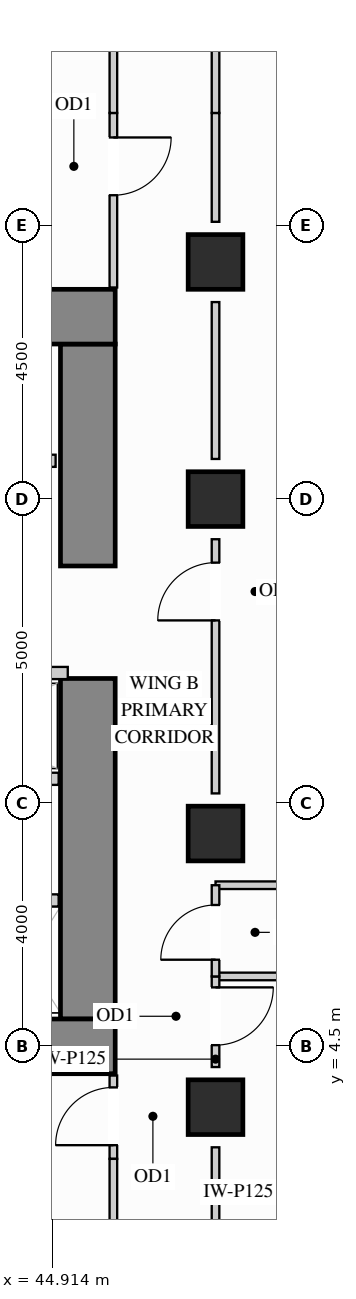
"""IFC4 building model, lengths in metres.
Left out: names, types, materials, properties, quantities, classifications, styles, units other than length and angle.
Written with IfcOpenShell. Run it as: python <this file> out.ifc"""

import sys

from ifc_helpers import new_model, si_unit, direction, frame, frame_2d, origin, origin_2d, place, context, subcontext, project, spatial, rectangle, extrude, source, transform, mapped, element, fill, save


model = new_model("IFC4")
c1 = context("Model", 3, precision=1e-05, world=origin(), true_north=direction((0.0, 1.0)))
c2 = subcontext(c1, "Body", "Model", "MODEL_VIEW")
j1 = project(units=[si_unit("LENGTHUNIT", "METRE"), si_unit("PLANEANGLEUNIT", "RADIAN")], contexts=[c1])
p1 = place(None, origin())
s1 = spatial("IfcSite", under=j1, at=p1, CompositionType="ELEMENT")
p2 = place(p1, origin())
s2 = spatial("IfcBuilding", under=s1, at=p2, CompositionType="ELEMENT")
p3 = place(p2, frame((0.0, 0.0, 58.5)))
s3 = spatial("IfcBuildingStorey", under=s2, at=p3, CompositionType="ELEMENT", Elevation=58.5)
m1 = source(origin(), c2, "Body", "SweptSolid", [
    extrude(rectangle(XDim=0.9, YDim=0.9, at=origin_2d()), origin(), (0.0, 0.0, 1.0), 3.38),
])
for number, where, z_axis, x_axis in (
    (1, (47.6, 13.5, 0.0), (0.0, 0.0, 1.0), (1.0, 0.0, 0.0)),
    (2, (47.6, 3.5, 0.0), (0.0, 0.0, 1.0), (1.0, 0.0, 0.0)),
    (3, (47.6, 8.0, 0.0), (0.0, 0.0, 1.0), (1.0, 0.0, 0.0)),
    (4, (47.6, 17.4, 0.0), (0.0, 0.0, 1.0), (1.0, 0.0, 0.0)),
):
    element("IfcColumn", number, at=place(p3, frame(where, z_axis=z_axis, x_axis=x_axis)), inside=s3, PredefinedType="COLUMN", context=c2, shape_type="MappedRepresentation", body=[
        mapped(m1, transform((0.0, 0.0, 0.0), x_axis=(1.0, 0.0, 0.0), y_axis=(0.0, 1.0, 0.0), z_axis=(0.0, 0.0, 1.0))),
    ])
m2 = source(origin(), c2, "Body", "SweptSolid", [
    extrude(rectangle(XDim=5.6, YDim=0.9, at=frame_2d((2.8, 0.0))), origin(), (0.0, 0.0, 1.0), 3.38),
])
p4 = place(p3, frame((45.5, 4.95, 0.0), z_axis=(0.0, 0.0, 1.0), x_axis=(0.0, 1.0, 0.0)))
e5 = element("IfcWall", 5, at=p4, inside=s3, PredefinedType="SHEAR", context=c2, shape_type="MappedRepresentation", body=[
    mapped(m2, transform((0.0, 0.0, 0.0), x_axis=(1.0, 0.0, 0.0), y_axis=(0.0, 1.0, 0.0), z_axis=(0.0, 0.0, 1.0))),
])
m3 = source(origin(), c2, "Body", "SweptSolid", [
    extrude(rectangle(XDim=3.65, YDim=0.9, at=frame_2d((1.825, 0.0))), origin(), (0.0, 0.0, 1.0), 3.38),
])
p5 = place(p3, frame((45.5, 12.4, 0.0), z_axis=(0.0, 0.0, 1.0), x_axis=(0.0, 1.0, 0.0)))
e6 = element("IfcWall", 6, at=p5, inside=s3, PredefinedType="SHEAR", context=c2, shape_type="MappedRepresentation", body=[
    mapped(m3, transform((0.0, 0.0, 0.0), x_axis=(1.0, 0.0, 0.0), y_axis=(0.0, 1.0, 0.0), z_axis=(0.0, 0.0, 1.0))),
])
m4 = source(origin(), c2, "Body", "SweptSolid", [
    extrude(rectangle(XDim=10.4, YDim=0.9, at=frame_2d((5.2, 0.0))), origin(), (0.0, 0.0, 1.0), 3.38),
])
for number, where, z_axis, x_axis in (
    (7, (35.55, 16.5, 0.0), (0.0, 0.0, 1.0), (1.0, 0.0, 0.0)),
    (8, (35.55, 4.5, 0.0), (0.0, 0.0, 1.0), (1.0, 0.0, 0.0)),
):
    element("IfcWall", number, at=place(p3, frame(where, z_axis=z_axis, x_axis=x_axis)), inside=s3, PredefinedType="SHEAR", context=c2, shape_type="MappedRepresentation", body=[
        mapped(m4, transform((0.0, 0.0, 0.0), x_axis=(1.0, 0.0, 0.0), y_axis=(0.0, 1.0, 0.0), z_axis=(0.0, 0.0, 1.0))),
    ])
m5 = source(origin(), c2, "Body", "SweptSolid", [
    extrude(rectangle(XDim=11.048, YDim=0.125, at=frame_2d((5.524, 0.0))), origin(), (0.0, 0.0, 1.0), 3.365),
])
for number, where, z_axis, x_axis in (
    (9, (47.6, 5.65, 0.0), (0.0, 0.0, 1.0), (1.0, 0.0, 0.0)),
    (10, (47.6, 7.15, 0.0), (0.0, 0.0, 1.0), (1.0, 0.0, 0.0)),
):
    element("IfcWall", number, at=place(p3, frame(where, z_axis=z_axis, x_axis=x_axis)), inside=s3, PredefinedType="PARTITIONING", context=c2, shape_type="MappedRepresentation", body=[
        mapped(m5, transform((0.0, 0.0, 0.0), x_axis=(1.0, 0.0, 0.0), y_axis=(0.0, 1.0, 0.0), z_axis=(0.0, 0.0, 1.0))),
    ])
p6 = place(p3, frame((47.6, 4.16, 0.0), z_axis=(0.0, 0.0, 1.0), x_axis=(0.0, 1.0, 0.0)))
e11 = element("IfcWall", 11, at=p6, inside=s3, PredefinedType="PARTITIONING", context=c2, shape_type="SweptSolid", body=[
    extrude(rectangle(XDim=1.49, YDim=0.125, at=frame_2d((0.745, 0.0))), origin(), (0.0, 0.0, 1.0), 2.67),
])
p7 = place(p6, frame((0.36, 0.0, 0.0)))
e12 = element("IfcOpeningElement", 12, at=p7, cuts=e11, PredefinedType="OPENING", context=c2, shape_type="SweptSolid", body=[
    extrude(rectangle(XDim=0.95, YDim=2.15, at=frame_2d((0.475, 1.075))), frame((0.0, 0.073, 0.0), z_axis=(0.0, -1.0, 0.0), x_axis=(1.0, 0.0, 0.0)), (0.0, 0.0, 1.0), 0.145),
])
m6 = source(origin(), c2, "Body", "SweptSolid", [
    extrude(rectangle(XDim=1.58, YDim=0.125, at=frame_2d((0.79, 0.0))), origin(), (0.0, 0.0, 1.0), 2.67),
])
p8 = place(p3, frame((47.6, 1.26, 0.0), z_axis=(0.0, 0.0, 1.0), x_axis=(0.0, 1.0, 0.0)))
e13 = element("IfcWall", 13, at=p8, inside=s3, PredefinedType="PARTITIONING", context=c2, shape_type="MappedRepresentation", body=[
    mapped(m6, transform((0.0, 0.0, 0.0), x_axis=(1.0, 0.0, 0.0), y_axis=(0.0, 1.0, 0.0), z_axis=(0.0, 0.0, 1.0))),
])
p9 = place(p3, frame((47.6, 8.66, 0.0), z_axis=(0.0, 0.0, 1.0), x_axis=(0.0, 1.0, 0.0)))
e14 = element("IfcWall", 14, at=p9, inside=s3, PredefinedType="PARTITIONING", context=c2, shape_type="SweptSolid", body=[
    extrude(rectangle(XDim=4.18, YDim=0.125, at=frame_2d((2.09, 0.0))), origin(), (0.0, 0.0, 1.0), 2.67),
])
p10 = place(p9, frame((2.845, 0.0, 0.0)))
e15 = element("IfcOpeningElement", 15, at=p10, cuts=e14, PredefinedType="OPENING", context=c2, shape_type="SweptSolid", body=[
    extrude(rectangle(XDim=0.95, YDim=2.15, at=frame_2d((0.475, 1.075))), frame((0.0, 0.073, 0.0), z_axis=(0.0, -1.0, 0.0), x_axis=(1.0, 0.0, 0.0)), (0.0, 0.0, 1.0), 0.145),
])
m7 = source(origin(), c2, "Body", "SweptSolid", [
    extrude(rectangle(XDim=2.58, YDim=0.125, at=frame_2d((1.29, 0.0))), origin(), (0.0, 0.0, 1.0), 2.67),
])
p11 = place(p3, frame((47.6, 14.16, 0.0), z_axis=(0.0, 0.0, 1.0), x_axis=(0.0, 1.0, 0.0)))
e16 = element("IfcWall", 16, at=p11, inside=s3, PredefinedType="PARTITIONING", context=c2, shape_type="MappedRepresentation", body=[
    mapped(m7, transform((0.0, 0.0, 0.0), x_axis=(1.0, 0.0, 0.0), y_axis=(0.0, 1.0, 0.0), z_axis=(0.0, 0.0, 1.0))),
])
m8 = source(origin(), c2, "Body", "SweptSolid", [
    extrude(rectangle(XDim=1.79, YDim=0.125, at=frame_2d((0.895, 0.0))), origin(), (0.0, 0.0, 1.0), 2.67),
])
p12 = place(p3, frame((47.6, 18.06, 0.0), z_axis=(0.0, 0.0, 1.0), x_axis=(0.0, 1.0, 0.0)))
e17 = element("IfcWall", 17, at=p12, inside=s3, PredefinedType="PARTITIONING", context=c2, shape_type="MappedRepresentation", body=[
    mapped(m8, transform((0.0, 0.0, 0.0), x_axis=(1.0, 0.0, 0.0), y_axis=(0.0, 1.0, 0.0), z_axis=(0.0, 0.0, 1.0))),
])
m9 = source(origin(), c2, "Body", "SweptSolid", [
    extrude(rectangle(XDim=1.39, YDim=0.125, at=frame_2d((0.695, 0.0))), origin(), (0.0, 0.0, 1.0), 2.67),
])
p13 = place(p3, frame((47.6, 19.85, 0.0), z_axis=(0.0, 0.0, 1.0), x_axis=(0.0, 1.0, 0.0)))
e18 = element("IfcWall", 18, at=p13, inside=s3, PredefinedType="PARTITIONING", context=c2, shape_type="MappedRepresentation", body=[
    mapped(m9, transform((0.0, 0.0, 0.0), x_axis=(1.0, 0.0, 0.0), y_axis=(0.0, 1.0, 0.0), z_axis=(0.0, 0.0, 1.0))),
])
p14 = place(p3, frame((47.6, 5.65, 0.0), z_axis=(0.0, 0.0, 1.0), x_axis=(0.0, 1.0, 0.0)))
e19 = element("IfcWall", 19, at=p14, inside=s3, PredefinedType="PARTITIONING", context=c2, shape_type="SweptSolid", body=[
    extrude(rectangle(XDim=1.5, YDim=0.125, at=frame_2d((0.75, 0.0))), origin(), (0.0, 0.0, 1.0), 2.67),
])
p15 = place(p14, frame((0.275, 0.0, 0.0)))
e20 = element("IfcOpeningElement", 20, at=p15, cuts=e19, PredefinedType="OPENING", context=c2, shape_type="SweptSolid", body=[
    extrude(rectangle(XDim=0.9, YDim=2.15, at=frame_2d((0.45, 1.075))), frame((0.0, 0.073, 0.0), z_axis=(0.0, -1.0, 0.0), x_axis=(1.0, 0.0, 0.0)), (0.0, 0.0, 1.0), 0.145),
])
p16 = place(p3, frame((45.92, 16.98, 0.0), z_axis=(0.0, 0.0, 1.0), x_axis=(0.0, 1.0, 0.0)))
e21 = element("IfcWall", 21, at=p16, inside=s3, PredefinedType="PARTITIONING", context=c2, shape_type="SweptSolid", body=[
    extrude(rectangle(XDim=2.87, YDim=0.125, at=frame_2d((1.435, 0.0))), origin(), (0.0, 0.0, 1.0), 3.365),
])
p17 = place(p16, frame((1.517, 0.0, 0.0)))
e22 = element("IfcOpeningElement", 22, at=p17, cuts=e21, PredefinedType="OPENING", context=c2, shape_type="SweptSolid", body=[
    extrude(rectangle(XDim=0.95, YDim=2.15, at=frame_2d((0.475, 1.075))), frame((0.0, 0.073, 0.0), z_axis=(0.0, -1.0, 0.0), x_axis=(1.0, 0.0, 0.0)), (0.0, 0.0, 1.0), 0.145),
])
m10 = source(origin(), c2, "Body", "SweptSolid", [
    extrude(rectangle(XDim=2.298, YDim=0.125, at=frame_2d((1.149, 0.0))), origin(), (0.0, 0.0, 1.0), 3.365),
])
p18 = place(p3, frame((45.92, 19.85, 0.0), z_axis=(0.0, 0.0, 1.0), x_axis=(0.0, 1.0, 0.0)))
e23 = element("IfcWall", 23, at=p18, inside=s3, PredefinedType="PARTITIONING", context=c2, shape_type="MappedRepresentation", body=[
    mapped(m10, transform((0.0, 0.0, 0.0), x_axis=(1.0, 0.0, 0.0), y_axis=(0.0, 1.0, 0.0), z_axis=(0.0, 0.0, 1.0))),
])
p19 = place(p3, frame((45.92, 2.65, 0.0), z_axis=(0.0, 0.0, 1.0), x_axis=(0.0, 1.0, 0.0)))
e24 = element("IfcWall", 24, at=p19, inside=s3, PredefinedType="PARTITIONING", context=c2, shape_type="SweptSolid", body=[
    extrude(rectangle(XDim=1.37, YDim=0.125, at=frame_2d((0.685, 0.0))), origin(), (0.0, 0.0, 1.0), 3.365),
])
p20 = place(p19, frame((0.225, 0.0, 0.0)))
e25 = element("IfcOpeningElement", 25, at=p20, cuts=e24, PredefinedType="OPENING", context=c2, shape_type="SweptSolid", body=[
    extrude(rectangle(XDim=0.95, YDim=2.15, at=frame_2d((0.475, 1.075))), frame((0.0, 0.073, 0.0), z_axis=(0.0, -1.0, 0.0), x_axis=(1.0, 0.0, 0.0)), (0.0, 0.0, 1.0), 0.145),
])
p21 = place(p3, frame((45.92, 0.352, 0.0), z_axis=(0.0, 0.0, 1.0), x_axis=(0.0, 1.0, 0.0)))
e26 = element("IfcWall", 26, at=p21, inside=s3, PredefinedType="PARTITIONING", context=c2, shape_type="MappedRepresentation", body=[
    mapped(m10, transform((0.0, 0.0, 0.0), x_axis=(1.0, 0.0, 0.0), y_axis=(0.0, 1.0, 0.0), z_axis=(0.0, 0.0, 1.0))),
])
m11 = source(origin(), c2, "Body", "SweptSolid", [
    extrude(rectangle(XDim=1.17, YDim=0.2, at=frame_2d((0.585, 0.0))), origin(), (0.0, 0.0, 1.0), 3.365),
])
p22 = place(p3, frame((43.85, 6.9, 0.0), z_axis=(0.0, 0.0, 1.0), x_axis=(1.0, 0.0, 0.0)))
e27 = element("IfcWall", 27, at=p22, inside=s3, PredefinedType="PARTITIONING", context=c2, shape_type="MappedRepresentation", body=[
    mapped(m11, transform((0.0, 0.0, 0.0), x_axis=(1.0, 0.0, 0.0), y_axis=(0.0, 1.0, 0.0), z_axis=(0.0, 0.0, 1.0))),
])
p23 = place(p3, frame((42.23, 14.13, 0.0), z_axis=(0.0, 0.0, 1.0), x_axis=(1.0, 0.0, 0.0)))
e28 = element("IfcWall", 28, at=p23, inside=s3, PredefinedType="PARTITIONING", context=c2, shape_type="SweptSolid", body=[
    extrude(rectangle(XDim=2.74, YDim=0.2, at=frame_2d((1.37, 0.0))), origin(), (0.0, 0.0, 1.0), 3.365),
])
p24 = place(p23, frame((0.82, 0.0, 0.0)))
e29 = element("IfcOpeningElement", 29, at=p24, cuts=e28, PredefinedType="OPENING", context=c2, shape_type="SweptSolid", body=[
    extrude(rectangle(XDim=1.1, YDim=2.2, at=frame_2d((0.55, 1.1))), frame((0.0, 0.11, 0.0), z_axis=(0.0, -1.0, 0.0), x_axis=(1.0, 0.0, 0.0)), (0.0, 0.0, 1.0), 0.22),
])
m12 = source(origin(), c2, "Body", "SweptSolid", [
    extrude(rectangle(XDim=3.49, YDim=0.2, at=frame_2d((1.745, 0.0))), origin(), (0.0, 0.0, 1.0), 3.365),
])
p25 = place(p3, frame((41.68, 10.64, 0.0), z_axis=(0.0, 0.0, 1.0), x_axis=(1.0, 0.0, 0.0)))
e30 = element("IfcWall", 30, at=p25, inside=s3, PredefinedType="PARTITIONING", context=c2, shape_type="MappedRepresentation", body=[
    mapped(m12, transform((0.0, 0.0, 0.0), x_axis=(1.0, 0.0, 0.0), y_axis=(0.0, 1.0, 0.0), z_axis=(0.0, 0.0, 1.0))),
])
m13 = source(origin(), c2, "Body", "SweptSolid", [
    extrude(rectangle(XDim=3.34, YDim=0.2, at=frame_2d((1.67, 0.0))), origin(), (0.0, 0.0, 1.0), 3.365),
])
p26 = place(p3, frame((41.68, 8.9, 0.0), z_axis=(0.0, 0.0, 1.0), x_axis=(1.0, 0.0, 0.0)))
e31 = element("IfcWall", 31, at=p26, inside=s3, PredefinedType="PARTITIONING", context=c2, shape_type="MappedRepresentation", body=[
    mapped(m13, transform((0.0, 0.0, 0.0), x_axis=(1.0, 0.0, 0.0), y_axis=(0.0, 1.0, 0.0), z_axis=(0.0, 0.0, 1.0))),
])
m14 = source(origin(), c2, "Body", "SweptSolid", [
    extrude(rectangle(XDim=0.95, YDim=2.15, at=frame_2d((0.475, 1.075))), frame((0.0, 0.025, 0.0), z_axis=(0.0, -1.0, 0.0), x_axis=(1.0, 0.0, 0.0)), (0.0, 0.0, 1.0), 0.05),
])
p27 = place(p17, origin())
e32 = element("IfcDoor", 32, at=p27, inside=s3, OperationType="SINGLE_SWING_RIGHT", PredefinedType="DOOR", context=c2, shape_type="MappedRepresentation", body=[
    mapped(m14, transform((0.0, 0.0, 0.0), x_axis=(1.0, 0.0, 0.0), y_axis=(0.0, 1.0, 0.0), z_axis=(0.0, 0.0, 1.0))),
])
fill(e22, e32)
p28 = place(p20, origin())
e33 = element("IfcDoor", 33, at=p28, inside=s3, OperationType="SINGLE_SWING_LEFT", PredefinedType="DOOR", context=c2, shape_type="MappedRepresentation", body=[
    mapped(m14, transform((0.0, 0.0, 0.0), x_axis=(1.0, 0.0, 0.0), y_axis=(0.0, 1.0, 0.0), z_axis=(0.0, 0.0, 1.0))),
])
fill(e25, e33)
p29 = place(p7, origin())
e34 = element("IfcDoor", 34, at=p29, inside=s3, OperationType="SINGLE_SWING_RIGHT", PredefinedType="DOOR", context=c2, shape_type="MappedRepresentation", body=[
    mapped(m14, transform((0.0, 0.0, 0.0), x_axis=(1.0, 0.0, 0.0), y_axis=(0.0, 1.0, 0.0), z_axis=(0.0, 0.0, 1.0))),
])
fill(e12, e34)
p30 = place(p10, origin())
e35 = element("IfcDoor", 35, at=p30, inside=s3, OperationType="SINGLE_SWING_LEFT", PredefinedType="DOOR", context=c2, shape_type="MappedRepresentation", body=[
    mapped(m14, transform((0.0, 0.0, 0.0), x_axis=(1.0, 0.0, 0.0), y_axis=(0.0, 1.0, 0.0), z_axis=(0.0, 0.0, 1.0))),
])
fill(e15, e35)
m15 = source(origin(), c2, "Body", "SweptSolid", [
    extrude(rectangle(XDim=0.9, YDim=2.15, at=frame_2d((0.45, 1.075))), frame((0.0, 0.025, 0.0), z_axis=(0.0, -1.0, 0.0), x_axis=(1.0, 0.0, 0.0)), (0.0, 0.0, 1.0), 0.05),
])
p31 = place(p15, origin())
e36 = element("IfcDoor", 36, at=p31, inside=s3, OperationType="SINGLE_SWING_LEFT", PredefinedType="DOOR", context=c2, shape_type="MappedRepresentation", body=[
    mapped(m15, transform((0.0, 0.0, 0.0), x_axis=(1.0, 0.0, 0.0), y_axis=(0.0, 1.0, 0.0), z_axis=(0.0, 0.0, 1.0))),
])
fill(e20, e36)
save(model, sys.argv[1])
